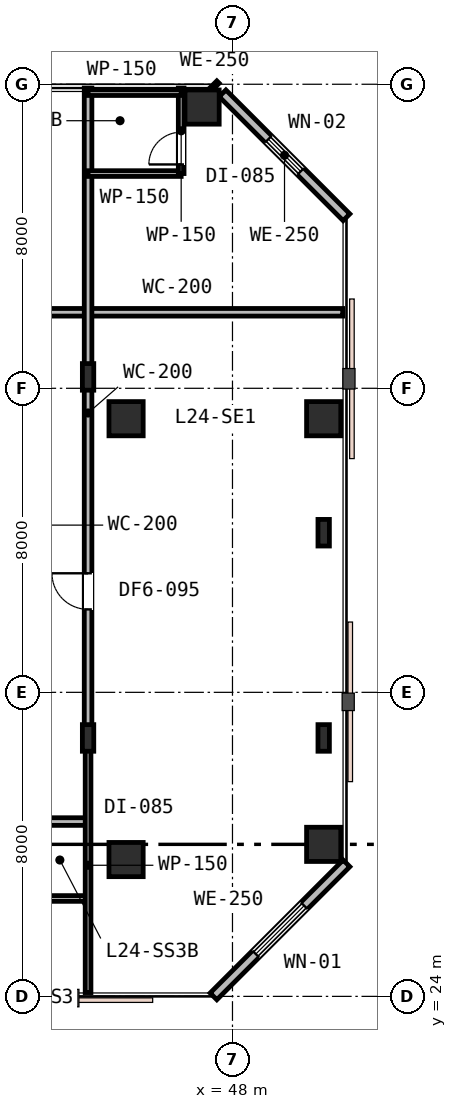
"""IFC4 building model, lengths in metres.
Left out: names, types, materials, properties, quantities, classifications, styles, units other than length and angle.
Written with IfcOpenShell. Run it as: python <this file> out.ifc"""

import sys

from ifc_helpers import new_model, si_unit, direction, frame, frame_2d, origin, origin_2d, place, context, subcontext, project, spatial, rectangle, i_section, extrude, element, fill, save


model = new_model("IFC4")
c1 = context("Model", 3, precision=1e-05, world=origin(), true_north=direction((0.0, 1.0)))
c2 = subcontext(c1, "Body", "Model", "MODEL_VIEW")
j1 = project(units=[si_unit("LENGTHUNIT", "METRE"), si_unit("PLANEANGLEUNIT", "RADIAN")], contexts=[c1])
p1 = place(None, origin())
s1 = spatial("IfcSite", under=j1, at=p1, CompositionType="ELEMENT")
p2 = place(p1, origin())
s2 = spatial("IfcBuilding", under=s1, at=p2, CompositionType="ELEMENT")
p3 = place(p2, frame((0.0, 0.0, 97.2)))
s3 = spatial("IfcBuildingStorey", under=s2, at=p3, CompositionType="ELEMENT", Elevation=97.2)
for number, where, z_axis, x_axis in (
    (1, (45.2, 27.6, 0.0), (0.0, 0.0, 1.0), (1.0, 0.0, 0.0)),
    (2, (45.2, 39.2, 0.0), (0.0, 0.0, 1.0), (1.0, 0.0, 0.0)),
    (3, (47.2, 47.4, 0.0), (0.0, 0.0, 1.0), (1.0, 0.0, 0.0)),
    (4, (50.4, 28.0, 0.0), (0.0, 0.0, 1.0), (1.0, 0.0, 0.0)),
    (5, (50.4, 39.2, 0.0), (0.0, 0.0, 1.0), (1.0, 0.0, 0.0)),
):
    element("IfcColumn", number, at=place(p3, frame(where, z_axis=z_axis, x_axis=x_axis)), inside=s3, PredefinedType="COLUMN", context=c2, shape_type="SweptSolid", body=[
        extrude(rectangle(XDim=0.9, YDim=0.9, at=origin_2d()), origin(), (0.0, 0.0, 1.0), 3.6),
    ])
for number, where, z_axis, x_axis in (
    (6, (44.2, 30.8, 0.0), (0.0, 0.0, 1.0), (1.0, 0.0, 0.0)),
    (7, (44.2, 40.3, 0.0), (0.0, 0.0, 1.0), (1.0, 0.0, 0.0)),
    (8, (50.4, 30.8, 0.0), (0.0, 0.0, 1.0), (1.0, 0.0, 0.0)),
    (9, (50.4, 36.2, 0.0), (0.0, 0.0, 1.0), (1.0, 0.0, 0.0)),
):
    element("IfcColumn", number, at=place(p3, frame(where, z_axis=z_axis, x_axis=x_axis)), inside=s3, PredefinedType="COLUMN", context=c2, shape_type="SweptSolid", body=[
        extrude(i_section(OverallWidth=0.3, OverallDepth=0.7, WebThickness=0.017, FlangeThickness=0.032, FilletRadius=0.027, at=origin_2d()), origin(), (0.0, 0.0, 1.0), 3.6),
    ])
p4 = place(p3, frame((47.5, 24.0, 0.0), z_axis=(0.0, 0.0, 1.0), x_axis=(0.707106781187, 0.707106781187, 0.0)))
e10 = element("IfcWall", 10, at=p4, inside=s3, PredefinedType="STANDARD", context=c2, shape_type="SweptSolid", body=[
    extrude(rectangle(XDim=4.95, YDim=0.25, at=frame_2d((2.475, 0.0))), origin(), (0.0, 0.0, 1.0), 3.33),
])
p5 = place(p4, frame((1.575, 0.0, 0.75)))
e11 = element("IfcOpeningElement", 11, at=p5, cuts=e10, PredefinedType="OPENING", context=c2, shape_type="SweptSolid", body=[
    extrude(rectangle(XDim=1.8, YDim=1.85, at=frame_2d((0.9, 0.925))), frame((0.0, 0.135, 0.0), z_axis=(0.0, -1.0, 0.0), x_axis=(1.0, 0.0, 0.0)), (0.0, 0.0, 1.0), 0.27),
])
p6 = place(p3, frame((51.0, 44.5, 0.0), z_axis=(0.0, 0.0, 1.0), x_axis=(-0.707106781187, 0.707106781187, 0.0)))
e12 = element("IfcWall", 12, at=p6, inside=s3, PredefinedType="STANDARD", context=c2, shape_type="SweptSolid", body=[
    extrude(rectangle(XDim=4.613, YDim=0.25, at=frame_2d((2.306, 0.0))), origin(), (0.0, 0.0, 1.0), 3.33),
])
p7 = place(p6, frame((1.706, 0.0, 0.85)))
e13 = element("IfcOpeningElement", 13, at=p7, cuts=e12, PredefinedType="OPENING", context=c2, shape_type="SweptSolid", body=[
    extrude(rectangle(XDim=1.2, YDim=1.6, at=frame_2d((0.6, 0.8))), frame((0.0, 0.135, 0.0), z_axis=(0.0, -1.0, 0.0), x_axis=(1.0, 0.0, 0.0)), (0.0, 0.0, 1.0), 0.27),
])
p8 = place(p3, frame((47.562, 47.938, 0.0), z_axis=(0.0, 0.0, 1.0), x_axis=(-0.707106781187, 0.707106781187, 0.0)))
e14 = element("IfcWall", 14, at=p8, inside=s3, PredefinedType="STANDARD", context=c2, shape_type="SweptSolid", body=[
    extrude(rectangle(XDim=0.087, YDim=0.25, at=frame_2d((0.044, 0.0))), origin(), (0.0, 0.0, 1.0), 3.33),
])
p9 = place(p3, frame((11.4, 28.6, 0.0), z_axis=(0.0, 0.0, 1.0), x_axis=(1.0, 0.0, 0.0)))
e15 = element("IfcWall", 15, at=p9, inside=s3, PredefinedType="PARTITIONING", context=c2, shape_type="SweptSolid", body=[
    extrude(rectangle(XDim=32.8, YDim=0.2, at=frame_2d((16.4, 0.0))), origin(), (0.0, 0.0, 1.0), 2.83),
])
p10 = place(p9, frame((14.7, 0.0, 0.0)))
e16 = element("IfcOpeningElement", 16, at=p10, cuts=e15, PredefinedType="OPENING", context=c2, shape_type="SweptSolid", body=[
    extrude(rectangle(XDim=0.95, YDim=2.15, at=frame_2d((0.475, 1.075))), frame((0.0, 0.11, 0.0), z_axis=(0.0, -1.0, 0.0), x_axis=(1.0, 0.0, 0.0)), (0.0, 0.0, 1.0), 0.22),
])
p11 = place(p9, frame((22.475, 0.0, 0.0)))
e17 = element("IfcOpeningElement", 17, at=p11, cuts=e15, PredefinedType="OPENING", context=c2, shape_type="SweptSolid", body=[
    extrude(rectangle(XDim=0.95, YDim=2.15, at=frame_2d((0.475, 1.075))), frame((0.0, 0.11, 0.0), z_axis=(0.0, -1.0, 0.0), x_axis=(1.0, 0.0, 0.0)), (0.0, 0.0, 1.0), 0.22),
])
p12 = place(p9, frame((28.985, 0.0, 0.0)))
e18 = element("IfcOpeningElement", 18, at=p12, cuts=e15, PredefinedType="OPENING", context=c2, shape_type="SweptSolid", body=[
    extrude(rectangle(XDim=0.95, YDim=2.15, at=frame_2d((0.475, 1.075))), frame((0.0, 0.11, 0.0), z_axis=(0.0, -1.0, 0.0), x_axis=(1.0, 0.0, 0.0)), (0.0, 0.0, 1.0), 0.22),
])
p13 = place(p3, frame((42.2, 42.0, 0.0), z_axis=(0.0, 0.0, 1.0), x_axis=(1.0, 0.0, 0.0)))
e19 = element("IfcWall", 19, at=p13, inside=s3, PredefinedType="PARTITIONING", context=c2, shape_type="SweptSolid", body=[
    extrude(rectangle(XDim=8.7, YDim=0.2, at=frame_2d((4.35, 0.0))), origin(), (0.0, 0.0, 1.0), 3.33),
])
p14 = place(p3, frame((42.35, 26.576, 0.0), z_axis=(0.0, 0.0, 1.0), x_axis=(1.0, 0.0, 0.0)))
e20 = element("IfcWall", 20, at=p14, inside=s3, PredefinedType="PARTITIONING", context=c2, shape_type="SweptSolid", body=[
    extrude(rectangle(XDim=1.85, YDim=0.15, at=frame_2d((0.925, 0.0))), origin(), (0.0, 0.0, 1.0), 3.33),
])
p15 = place(p3, frame((44.2, 30.8, 0.0), z_axis=(0.0, 0.0, 1.0), x_axis=(0.0, -1.0, 0.0)))
e21 = element("IfcWall", 21, at=p15, inside=s3, PredefinedType="PARTITIONING", context=c2, shape_type="SweptSolid", body=[
    extrude(rectangle(XDim=6.7, YDim=0.15, at=frame_2d((3.35, 0.0))), origin(), (0.0, 0.0, 1.0), 2.83),
])
p16 = place(p3, frame((44.2, 30.8, 0.0), z_axis=(0.0, 0.0, 1.0), x_axis=(0.0, 1.0, 0.0)))
e22 = element("IfcWall", 22, at=p16, inside=s3, PredefinedType="PARTITIONING", context=c2, shape_type="SweptSolid", body=[
    extrude(rectangle(XDim=17.1, YDim=0.2, at=frame_2d((8.55, 0.0))), origin(), (0.0, 0.0, 1.0), 2.83),
])
p17 = place(p16, frame((3.382, 0.0, 0.0)))
e23 = element("IfcOpeningElement", 23, at=p17, cuts=e22, PredefinedType="OPENING", context=c2, shape_type="SweptSolid", body=[
    extrude(rectangle(XDim=0.95, YDim=2.15, at=frame_2d((0.475, 1.075))), frame((0.0, 0.11, 0.0), z_axis=(0.0, -1.0, 0.0), x_axis=(1.0, 0.0, 0.0)), (0.0, 0.0, 1.0), 0.22),
])
p18 = place(p3, frame((44.2, 45.65, 0.0), z_axis=(0.0, 0.0, 1.0), x_axis=(1.0, 0.0, 0.0)))
e24 = element("IfcWall", 24, at=p18, inside=s3, PredefinedType="PARTITIONING", context=c2, shape_type="SweptSolid", body=[
    extrude(rectangle(XDim=2.45, YDim=0.15, at=frame_2d((1.225, 0.0))), origin(), (0.0, 0.0, 1.0), 3.33),
])
p19 = place(p3, frame((46.65, 45.65, 0.0), z_axis=(0.0, 0.0, 1.0), x_axis=(0.0, 1.0, 0.0)))
e25 = element("IfcWall", 25, at=p19, inside=s3, PredefinedType="PARTITIONING", context=c2, shape_type="SweptSolid", body=[
    extrude(rectangle(XDim=2.25, YDim=0.15, at=frame_2d((1.125, 0.0))), origin(), (0.0, 0.0, 1.0), 2.92),
])
p20 = place(p19, frame((0.24, 0.0, 0.0)))
e26 = element("IfcOpeningElement", 26, at=p20, cuts=e25, PredefinedType="OPENING", context=c2, shape_type="SweptSolid", body=[
    extrude(rectangle(XDim=0.85, YDim=2.15, at=frame_2d((0.425, 1.075))), frame((0.0, 0.085, 0.0), z_axis=(0.0, -1.0, 0.0), x_axis=(1.0, 0.0, 0.0)), (0.0, 0.0, 1.0), 0.17),
])
p21 = place(p3, frame((44.2, 47.78, 0.0), z_axis=(0.0, 0.0, 1.0), x_axis=(1.0, 0.0, 0.0)))
e27 = element("IfcWall", 27, at=p21, inside=s3, PredefinedType="PARTITIONING", context=c2, shape_type="SweptSolid", body=[
    extrude(rectangle(XDim=2.45, YDim=0.15, at=frame_2d((1.225, 0.0))), origin(), (0.0, 0.0, 1.0), 2.92),
])
p22 = place(p5, origin())
e28 = element("IfcWindow", 28, at=p22, inside=s3, PartitioningType="SINGLE_PANEL", PredefinedType="WINDOW", context=c2, shape_type="SweptSolid", body=[
    extrude(rectangle(XDim=1.8, YDim=1.85, at=frame_2d((0.9, 0.925))), frame((0.0, 0.03, 0.0), z_axis=(0.0, -1.0, 0.0), x_axis=(1.0, 0.0, 0.0)), (0.0, 0.0, 1.0), 0.06),
])
fill(e11, e28)
p23 = place(p7, origin())
e29 = element("IfcWindow", 29, at=p23, inside=s3, PartitioningType="SINGLE_PANEL", PredefinedType="WINDOW", context=c2, shape_type="SweptSolid", body=[
    extrude(rectangle(XDim=1.2, YDim=1.6, at=frame_2d((0.6, 0.8))), frame((0.0, 0.03, 0.0), z_axis=(0.0, -1.0, 0.0), x_axis=(1.0, 0.0, 0.0)), (0.0, 0.0, 1.0), 0.06),
])
fill(e13, e29)
p24 = place(p17, origin())
e30 = element("IfcDoor", 30, at=p24, inside=s3, OperationType="SINGLE_SWING_RIGHT", PredefinedType="DOOR", context=c2, shape_type="SweptSolid", body=[
    extrude(rectangle(XDim=0.95, YDim=2.15, at=frame_2d((0.475, 1.075))), frame((0.0, 0.025, 0.0), z_axis=(0.0, -1.0, 0.0), x_axis=(1.0, 0.0, 0.0)), (0.0, 0.0, 1.0), 0.05),
])
fill(e23, e30)
p25 = place(p20, origin())
e31 = element("IfcDoor", 31, at=p25, inside=s3, OperationType="SINGLE_SWING_LEFT", PredefinedType="DOOR", context=c2, shape_type="SweptSolid", body=[
    extrude(rectangle(XDim=0.85, YDim=2.15, at=frame_2d((0.425, 1.075))), frame((0.0, 0.025, 0.0), z_axis=(0.0, -1.0, 0.0), x_axis=(1.0, 0.0, 0.0)), (0.0, 0.0, 1.0), 0.05),
])
fill(e26, e31)
save(model, sys.argv[1])
